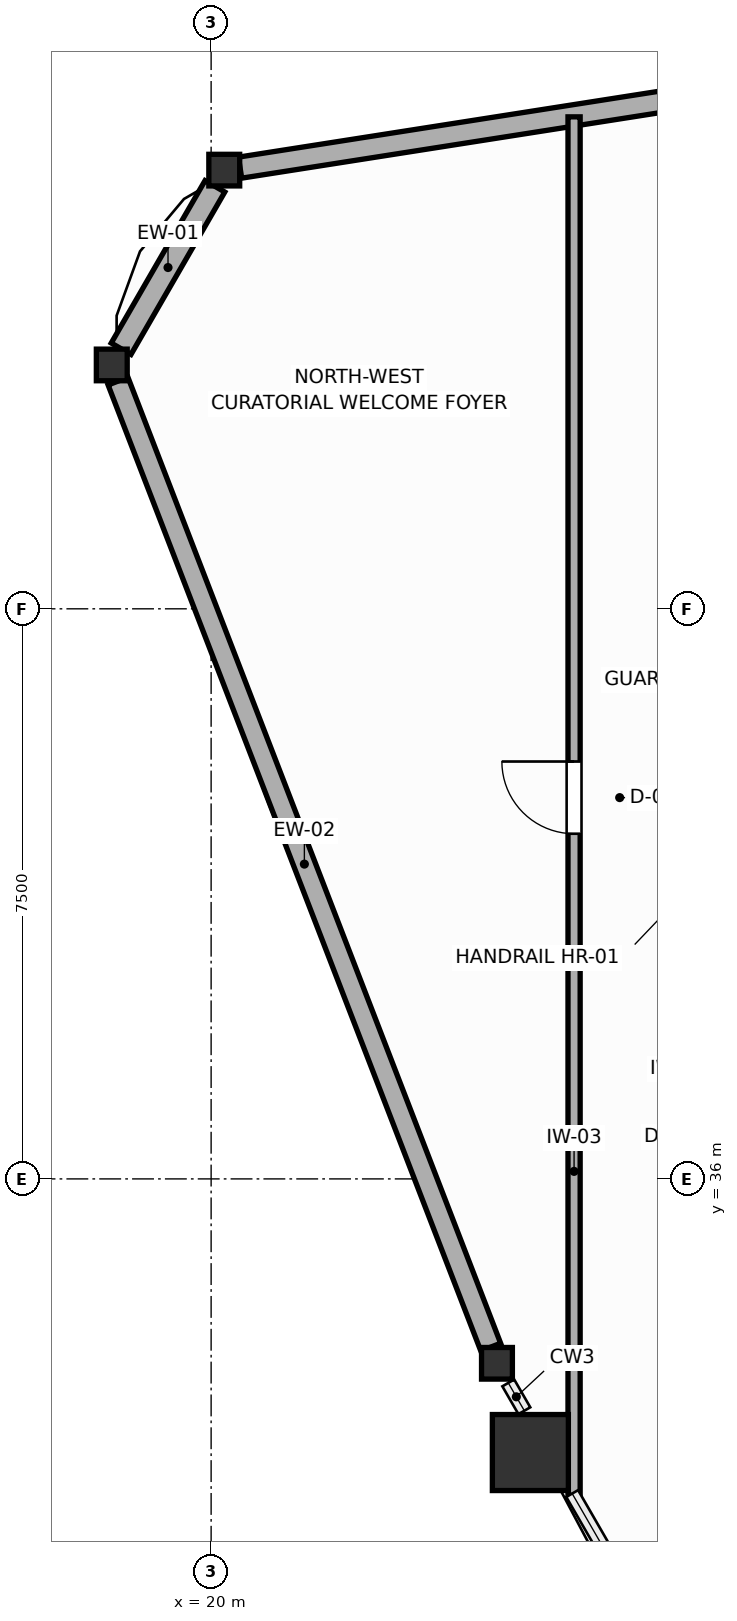
"""IFC4 building model, lengths in metres.
Left out: names, types, materials, properties, quantities, classifications, styles, units other than length and angle.
Written with IfcOpenShell. Run it as: python <this file> out.ifc"""

import sys

from ifc_helpers import new_model, si_unit, direction, frame, frame_2d, origin, origin_2d, place, context, subcontext, project, spatial, rectangle, i_section, extrude, source, transform, mapped, element, fill, save


model = new_model("IFC4")
c1 = context("Model", 3, precision=1e-05, world=origin(), true_north=direction((0.0, 1.0)))
c2 = subcontext(c1, "Body", "Model", "MODEL_VIEW")
j1 = project(units=[si_unit("LENGTHUNIT", "METRE"), si_unit("PLANEANGLEUNIT", "RADIAN")], contexts=[c1])
p1 = place(None, origin())
s1 = spatial("IfcSite", under=j1, at=p1, CompositionType="ELEMENT")
p2 = place(p1, origin())
s2 = spatial("IfcBuilding", under=s1, at=p2, CompositionType="ELEMENT")
p3 = place(p2, frame((0.0, 0.0, 223.8)))
s3 = spatial("IfcBuildingStorey", under=s2, at=p3, CompositionType="ELEMENT", Elevation=223.8)
m1 = source(origin(), c2, "Body", "SweptSolid", [
    extrude(rectangle(XDim=1.0, YDim=1.0, at=origin_2d()), origin(), (0.0, 0.0, 1.0), 3.6),
])
p4 = place(p3, frame((24.2, 32.4, 0.0), z_axis=(0.0, 0.0, 1.0), x_axis=(1.0, 0.0, 0.0)))
e1 = element("IfcColumn", 1, at=p4, inside=s3, PredefinedType="COLUMN", context=c2, shape_type="MappedRepresentation", body=[
    mapped(m1, transform((0.0, 0.0, 0.0), scale=1.0)),
])
m2 = source(origin(), c2, "Body", "SweptSolid", [
    extrude(i_section(OverallWidth=0.406, OverallDepth=0.416, WebThickness=0.027, FlangeThickness=0.044, FilletRadius=0.015, at=origin_2d()), origin(), (0.0, 0.0, 1.0), 3.6),
])
for number, where, z_axis, x_axis in (
    (2, (20.173, 49.271, 0.0), (0.0, 0.0, 1.0), (1.0, 0.0, 0.0)),
    (3, (18.693, 46.708, 0.0), (0.0, 0.0, 1.0), (1.0, 0.0, 0.0)),
    (4, (23.76, 33.574, 0.0), (0.0, 0.0, 1.0), (1.0, 0.0, 0.0)),
):
    element("IfcColumn", number, at=place(p3, frame(where, z_axis=z_axis, x_axis=x_axis)), inside=s3, PredefinedType="COLUMN", context=c2, shape_type="MappedRepresentation", body=[
        mapped(m2, transform((0.0, 0.0, 0.0), scale=1.0)),
    ])
p5 = place(p3, frame((33.873, 51.417, 0.0), z_axis=(0.0, 0.0, 1.0), x_axis=(-0.987957437721, -0.154725890697, 0.0)))
e5 = element("IfcWall", 5, at=p5, inside=s3, PredefinedType="SOLIDWALL", context=c2, shape_type="SweptSolid", body=[
    extrude(rectangle(XDim=13.657, YDim=0.28, at=frame_2d((6.828, 0.0))), origin(), (0.0, 0.0, 1.0), 1.88),
])
p6 = place(p3, frame((20.05, 49.059, 0.0), z_axis=(0.0, 0.0, 1.0), x_axis=(-0.499990780478, -0.866030726613, 0.0)))
e6 = element("IfcWall", 6, at=p6, inside=s3, PredefinedType="SOLIDWALL", context=c2, shape_type="SweptSolid", body=[
    extrude(rectangle(XDim=2.468, YDim=0.3, at=frame_2d((1.234, 0.0))), origin(), (0.0, 0.0, 1.0), 1.88),
])
p7 = place(p3, frame((18.775, 46.495, 0.0), z_axis=(0.0, 0.0, 1.0), x_axis=(0.359956541612, -0.93296907138, 0.0)))
e7 = element("IfcWall", 7, at=p7, inside=s3, PredefinedType="SOLIDWALL", context=c2, shape_type="SweptSolid", body=[
    extrude(rectangle(XDim=13.621, YDim=0.28, at=frame_2d((6.811, 0.0))), origin(), (0.0, 0.0, 1.0), 1.88),
])
p8 = place(p3, frame((24.775, 31.837, 0.0), z_axis=(0.0, 0.0, 1.0), x_axis=(0.0, 1.0, 0.0)))
e8 = element("IfcWall", 8, at=p8, inside=s3, PredefinedType="PARTITIONING", context=c2, shape_type="SweptSolid", body=[
    extrude(rectangle(XDim=18.135, YDim=0.16, at=frame_2d((9.068, 0.0))), origin(), (0.0, 0.0, 1.0), 3.41),
])
p9 = place(p8, frame((8.704, 0.0, 0.0)))
e9 = element("IfcOpeningElement", 9, at=p9, cuts=e8, PredefinedType="OPENING", context=c2, shape_type="SweptSolid", body=[
    extrude(rectangle(XDim=0.95, YDim=2.05, at=frame_2d((0.475, 1.025))), frame((0.0, 0.09, 0.0), z_axis=(0.0, -1.0, 0.0), x_axis=(1.0, 0.0, 0.0)), (0.0, 0.0, 1.0), 0.18),
])
p10 = place(p9, origin())
e10 = element("IfcDoor", 10, at=p10, inside=s3, OperationType="SINGLE_SWING_RIGHT", PredefinedType="DOOR", context=c2, shape_type="SweptSolid", body=[
    extrude(rectangle(XDim=0.95, YDim=2.05, at=frame_2d((0.475, 1.025))), frame((0.0, 0.025, 0.0), z_axis=(0.0, -1.0, 0.0), x_axis=(1.0, 0.0, 0.0)), (0.0, 0.0, 1.0), 0.05),
])
fill(e9, e10)
save(model, sys.argv[1])
